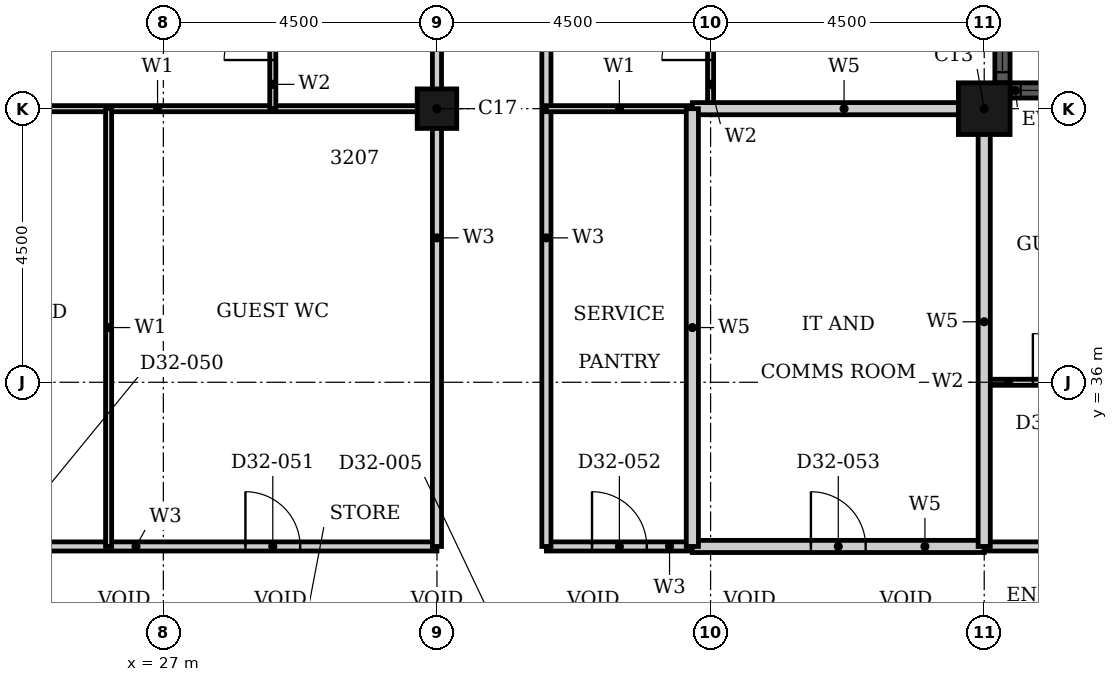
"""IFC4 building model, lengths in metres.
Left out: names, types, materials, properties, quantities, classifications, styles, units other than length and angle.
Written with IfcOpenShell. Run it as: python <this file> out.ifc"""

import sys

from ifc_helpers import new_model, si_unit, direction, frame, frame_2d, origin, origin_2d, place, context, subcontext, project, spatial, rectangle, hollow_rectangle, extrude, element, fill, save


model = new_model("IFC4")
c1 = context("Model", 3, precision=1e-05, world=origin(), true_north=direction((0.0, 1.0)))
c2 = subcontext(c1, "Body", "Model", "MODEL_VIEW")
j1 = project(units=[si_unit("LENGTHUNIT", "METRE"), si_unit("PLANEANGLEUNIT", "RADIAN")], contexts=[c1])
p1 = place(None, origin())
s1 = spatial("IfcSite", under=j1, at=p1, CompositionType="ELEMENT")
p2 = place(p1, origin())
s2 = spatial("IfcBuilding", under=s1, at=p2, CompositionType="ELEMENT")
p3 = place(p2, frame((0.0, 0.0, 129.6)))
s3 = spatial("IfcBuildingStorey", under=s2, at=p3, CompositionType="ELEMENT", Elevation=129.6)
p4 = place(p3, frame((40.5, 40.5, 0.0), z_axis=(0.0, 0.0, 1.0), x_axis=(1.0, 0.0, 0.0)))
e1 = element("IfcColumn", 1, at=p4, inside=s3, PredefinedType="COLUMN", context=c2, shape_type="SweptSolid", body=[
    extrude(hollow_rectangle(XDim=0.85, YDim=0.85, WallThickness=0.026, at=origin_2d()), origin(), (0.0, 0.0, 1.0), 3.6),
])
p5 = place(p3, frame((31.5, 40.5, 0.0), z_axis=(0.0, 0.0, 1.0), x_axis=(1.0, 0.0, 0.0)))
e2 = element("IfcColumn", 2, at=p5, inside=s3, PredefinedType="COLUMN", context=c2, shape_type="SweptSolid", body=[
    extrude(hollow_rectangle(XDim=0.65, YDim=0.65, WallThickness=0.021, at=origin_2d()), origin(), (0.0, 0.0, 1.0), 3.6),
])
p6 = place(p3, frame((44.575, 40.8, 0.0), z_axis=(0.0, 0.0, 1.0), x_axis=(-1.0, 0.0, 0.0)))
e3 = element("IfcWall", 3, at=p6, inside=s3, PredefinedType="SOLIDWALL", context=c2, shape_type="SweptSolid", body=[
    extrude(rectangle(XDim=3.65, YDim=0.25, at=frame_2d((1.825, 0.0))), origin(), (0.0, 0.0, 1.0), 3.6),
])
p7 = place(p6, frame((0.175, 0.0, 0.9)))
e4 = element("IfcOpeningElement", 4, at=p7, cuts=e3, PredefinedType="OPENING", context=c2, shape_type="SweptSolid", body=[
    extrude(rectangle(XDim=3.3, YDim=2.08, at=frame_2d((1.65, 1.04))), frame((0.0, 0.135, 0.0), z_axis=(0.0, -1.0, 0.0), x_axis=(1.0, 0.0, 0.0)), (0.0, 0.0, 1.0), 0.27),
])
p8 = place(p3, frame((40.8, 40.925, 0.0), z_axis=(0.0, 0.0, 1.0), x_axis=(0.0, 1.0, 0.0)))
e5 = element("IfcWall", 5, at=p8, inside=s3, PredefinedType="SOLIDWALL", context=c2, shape_type="SweptSolid", body=[
    extrude(rectangle(XDim=8.15, YDim=0.25, at=frame_2d((4.075, 0.0))), origin(), (0.0, 0.0, 1.0), 3.6),
])
p9 = place(p8, frame((0.175, 0.0, 0.9)))
e6 = element("IfcOpeningElement", 6, at=p9, cuts=e5, PredefinedType="OPENING", context=c2, shape_type="SweptSolid", body=[
    extrude(rectangle(XDim=3.3, YDim=2.08, at=frame_2d((1.65, 1.04))), frame((0.0, 0.135, 0.0), z_axis=(0.0, -1.0, 0.0), x_axis=(1.0, 0.0, 0.0)), (0.0, 0.0, 1.0), 0.27),
])
p10 = place(p8, frame((4.675, 0.0, 0.9)))
e7 = element("IfcOpeningElement", 7, at=p10, cuts=e5, PredefinedType="OPENING", context=c2, shape_type="SweptSolid", body=[
    extrude(rectangle(XDim=3.3, YDim=2.08, at=frame_2d((1.65, 1.04))), frame((0.0, 0.135, 0.0), z_axis=(0.0, -1.0, 0.0), x_axis=(1.0, 0.0, 0.0)), (0.0, 0.0, 1.0), 0.27),
])
p11 = place(p3, frame((18.0, 33.3, 0.0), z_axis=(0.0, 0.0, 1.0), x_axis=(1.0, 0.0, 0.0)))
e8 = element("IfcWall", 8, at=p11, inside=s3, PredefinedType="PARTITIONING", context=c2, shape_type="SweptSolid", body=[
    extrude(rectangle(XDim=13.5, YDim=0.15, at=frame_2d((6.75, 0.0))), origin(), (0.0, 0.0, 1.0), 3.3),
])
p12 = place(p11, frame((2.95, 0.0, 0.0)))
e9 = element("IfcOpeningElement", 9, at=p12, cuts=e8, PredefinedType="OPENING", context=c2, shape_type="SweptSolid", body=[
    extrude(rectangle(XDim=1.0, YDim=2.1, at=frame_2d((0.5, 1.05))), frame((0.0, 0.085, 0.0), z_axis=(0.0, -1.0, 0.0), x_axis=(1.0, 0.0, 0.0)), (0.0, 0.0, 1.0), 0.17),
])
p13 = place(p11, frame((5.85, 0.0, 0.0)))
e10 = element("IfcOpeningElement", 10, at=p13, cuts=e8, PredefinedType="OPENING", context=c2, shape_type="SweptSolid", body=[
    extrude(rectangle(XDim=0.9, YDim=2.1, at=frame_2d((0.45, 1.05))), frame((0.0, 0.085, 0.0), z_axis=(0.0, -1.0, 0.0), x_axis=(1.0, 0.0, 0.0)), (0.0, 0.0, 1.0), 0.17),
])
p14 = place(p11, frame((10.35, 0.0, 0.0)))
e11 = element("IfcOpeningElement", 11, at=p14, cuts=e8, PredefinedType="OPENING", context=c2, shape_type="SweptSolid", body=[
    extrude(rectangle(XDim=0.9, YDim=2.1, at=frame_2d((0.45, 1.05))), frame((0.0, 0.085, 0.0), z_axis=(0.0, -1.0, 0.0), x_axis=(1.0, 0.0, 0.0)), (0.0, 0.0, 1.0), 0.17),
])
p15 = place(p3, frame((40.5, 33.3, 0.0), z_axis=(0.0, 0.0, 1.0), x_axis=(1.0, 0.0, 0.0)))
e12 = element("IfcWall", 12, at=p15, inside=s3, PredefinedType="PARTITIONING", context=c2, shape_type="SweptSolid", body=[
    extrude(rectangle(XDim=6.3, YDim=0.15, at=frame_2d((3.15, 0.0))), origin(), (0.0, 0.0, 1.0), 3.3),
])
p16 = place(p15, frame((2.95, 0.0, 0.0)))
e13 = element("IfcOpeningElement", 13, at=p16, cuts=e12, PredefinedType="OPENING", context=c2, shape_type="SweptSolid", body=[
    extrude(rectangle(XDim=1.0, YDim=2.1, at=frame_2d((0.5, 1.05))), frame((0.0, 0.085, 0.0), z_axis=(0.0, -1.0, 0.0), x_axis=(1.0, 0.0, 0.0)), (0.0, 0.0, 1.0), 0.17),
])
p17 = place(p15, frame((4.95, 0.0, 0.0)))
e14 = element("IfcOpeningElement", 14, at=p17, cuts=e12, PredefinedType="OPENING", context=c2, shape_type="SweptSolid", body=[
    extrude(rectangle(XDim=0.9, YDim=2.1, at=frame_2d((0.45, 1.05))), frame((0.0, 0.085, 0.0), z_axis=(0.0, -1.0, 0.0), x_axis=(1.0, 0.0, 0.0)), (0.0, 0.0, 1.0), 0.17),
])
p18 = place(p3, frame((33.3, 33.3, 0.0), z_axis=(0.0, 0.0, 1.0), x_axis=(1.0, 0.0, 0.0)))
e15 = element("IfcWall", 15, at=p18, inside=s3, PredefinedType="PARTITIONING", context=c2, shape_type="SweptSolid", body=[
    extrude(rectangle(XDim=2.4, YDim=0.15, at=frame_2d((1.2, 0.0))), origin(), (0.0, 0.0, 1.0), 3.3),
])
p19 = place(p18, frame((0.75, 0.0, 0.0)))
e16 = element("IfcOpeningElement", 16, at=p19, cuts=e15, PredefinedType="OPENING", context=c2, shape_type="SweptSolid", body=[
    extrude(rectangle(XDim=0.9, YDim=2.1, at=frame_2d((0.45, 1.05))), frame((0.0, 0.085, 0.0), z_axis=(0.0, -1.0, 0.0), x_axis=(1.0, 0.0, 0.0)), (0.0, 0.0, 1.0), 0.17),
])
p20 = place(p3, frame((31.5, 33.3, 0.0), z_axis=(0.0, 0.0, 1.0), x_axis=(0.0, 1.0, 0.0)))
e17 = element("IfcWall", 17, at=p20, inside=s3, PredefinedType="PARTITIONING", context=c2, shape_type="SweptSolid", body=[
    extrude(rectangle(XDim=11.7, YDim=0.15, at=frame_2d((5.85, 0.0))), origin(), (0.0, 0.0, 1.0), 2.58),
])
p21 = place(p20, frame((10.15, 0.0, 0.0)))
e18 = element("IfcOpeningElement", 18, at=p21, cuts=e17, PredefinedType="OPENING", context=c2, shape_type="SweptSolid", body=[
    extrude(rectangle(XDim=1.0, YDim=2.1, at=frame_2d((0.5, 1.05))), frame((0.0, 0.085, 0.0), z_axis=(0.0, -1.0, 0.0), x_axis=(1.0, 0.0, 0.0)), (0.0, 0.0, 1.0), 0.17),
])
p22 = place(p3, frame((33.3, 33.3, 0.0), z_axis=(0.0, 0.0, 1.0), x_axis=(0.0, 1.0, 0.0)))
e19 = element("IfcWall", 19, at=p22, inside=s3, PredefinedType="PARTITIONING", context=c2, shape_type="SweptSolid", body=[
    extrude(rectangle(XDim=11.7, YDim=0.15, at=frame_2d((5.85, 0.0))), origin(), (0.0, 0.0, 1.0), 3.3),
])
p23 = place(p22, frame((10.15, 0.0, 0.0)))
e20 = element("IfcOpeningElement", 20, at=p23, cuts=e19, PredefinedType="OPENING", context=c2, shape_type="SweptSolid", body=[
    extrude(rectangle(XDim=1.0, YDim=2.1, at=frame_2d((0.5, 1.05))), frame((0.0, 0.085, 0.0), z_axis=(0.0, -1.0, 0.0), x_axis=(1.0, 0.0, 0.0)), (0.0, 0.0, 1.0), 0.17),
])
p24 = place(p3, frame((33.3, 40.5, 0.0), z_axis=(0.0, 0.0, 1.0), x_axis=(1.0, 0.0, 0.0)))
e21 = element("IfcWall", 21, at=p24, inside=s3, PredefinedType="PARTITIONING", context=c2, shape_type="SweptSolid", body=[
    extrude(rectangle(XDim=2.4, YDim=0.1, at=frame_2d((1.2, 0.0))), origin(), (0.0, 0.0, 1.0), 2.38),
])
p25 = place(p3, frame((22.31, 40.5, 0.0), z_axis=(0.0, 0.0, 1.0), x_axis=(1.0, 0.0, 0.0)))
e22 = element("IfcWall", 22, at=p25, inside=s3, PredefinedType="PARTITIONING", context=c2, shape_type="SweptSolid", body=[
    extrude(rectangle(XDim=9.19, YDim=0.1, at=frame_2d((4.595, 0.0))), origin(), (0.0, 0.0, 1.0), 2.38),
])
p26 = place(p3, frame((26.1, 33.3, 0.0), z_axis=(0.0, 0.0, 1.0), x_axis=(0.0, 1.0, 0.0)))
e23 = element("IfcWall", 23, at=p26, inside=s3, PredefinedType="PARTITIONING", context=c2, shape_type="SweptSolid", body=[
    extrude(rectangle(XDim=7.2, YDim=0.1, at=frame_2d((3.6, 0.0))), origin(), (0.0, 0.0, 1.0), 3.3),
])
p27 = place(p3, frame((40.5, 36.0, 0.0), z_axis=(0.0, 0.0, 1.0), x_axis=(1.0, 0.0, 0.0)))
e24 = element("IfcWall", 24, at=p27, inside=s3, PredefinedType="PARTITIONING", context=c2, shape_type="SweptSolid", body=[
    extrude(rectangle(XDim=2.4, YDim=0.1, at=frame_2d((1.2, 0.0))), origin(), (0.0, 0.0, 1.0), 3.3),
])
p28 = place(p27, frame((0.8, 0.0, 0.0)))
e25 = element("IfcOpeningElement", 25, at=p28, cuts=e24, PredefinedType="OPENING", context=c2, shape_type="SweptSolid", body=[
    extrude(rectangle(XDim=0.8, YDim=2.1, at=frame_2d((0.4, 1.05))), frame((0.0, 0.06, 0.0), z_axis=(0.0, -1.0, 0.0), x_axis=(1.0, 0.0, 0.0)), (0.0, 0.0, 1.0), 0.12),
])
p29 = place(p3, frame((28.8, 40.5, 0.0), z_axis=(0.0, 0.0, 1.0), x_axis=(0.0, 1.0, 0.0)))
e26 = element("IfcWall", 26, at=p29, inside=s3, PredefinedType="PARTITIONING", context=c2, shape_type="SweptSolid", body=[
    extrude(rectangle(XDim=2.4, YDim=0.1, at=frame_2d((1.2, 0.0))), origin(), (0.0, 0.0, 1.0), 3.3),
])
p30 = place(p29, frame((0.8, 0.0, 0.0)))
e27 = element("IfcOpeningElement", 27, at=p30, cuts=e26, PredefinedType="OPENING", context=c2, shape_type="SweptSolid", body=[
    extrude(rectangle(XDim=0.8, YDim=2.1, at=frame_2d((0.4, 1.05))), frame((0.0, 0.06, 0.0), z_axis=(0.0, -1.0, 0.0), x_axis=(1.0, 0.0, 0.0)), (0.0, 0.0, 1.0), 0.12),
])
p31 = place(p3, frame((36.0, 40.5, 0.0), z_axis=(0.0, 0.0, 1.0), x_axis=(0.0, 1.0, 0.0)))
e28 = element("IfcWall", 28, at=p31, inside=s3, PredefinedType="PARTITIONING", context=c2, shape_type="SweptSolid", body=[
    extrude(rectangle(XDim=2.4, YDim=0.1, at=frame_2d((1.2, 0.0))), origin(), (0.0, 0.0, 1.0), 2.58),
])
p32 = place(p31, frame((0.8, 0.0, 0.0)))
e29 = element("IfcOpeningElement", 29, at=p32, cuts=e28, PredefinedType="OPENING", context=c2, shape_type="SweptSolid", body=[
    extrude(rectangle(XDim=0.8, YDim=2.1, at=frame_2d((0.4, 1.05))), frame((0.0, 0.06, 0.0), z_axis=(0.0, -1.0, 0.0), x_axis=(1.0, 0.0, 0.0)), (0.0, 0.0, 1.0), 0.12),
])
p33 = place(p3, frame((35.7, 33.3, 0.0), z_axis=(0.0, 0.0, 1.0), x_axis=(1.0, 0.0, 0.0)))
e30 = element("IfcWall", 30, at=p33, inside=s3, PredefinedType="PARTITIONING", context=c2, shape_type="SweptSolid", body=[
    extrude(rectangle(XDim=4.8, YDim=0.2, at=frame_2d((2.4, 0.0))), origin(), (0.0, 0.0, 1.0), 3.3),
])
p34 = place(p33, frame((1.95, 0.0, 0.0)))
e31 = element("IfcOpeningElement", 31, at=p34, cuts=e30, PredefinedType="OPENING", context=c2, shape_type="SweptSolid", body=[
    extrude(rectangle(XDim=0.9, YDim=2.1, at=frame_2d((0.45, 1.05))), frame((0.0, 0.11, 0.0), z_axis=(0.0, -1.0, 0.0), x_axis=(1.0, 0.0, 0.0)), (0.0, 0.0, 1.0), 0.22),
])
p35 = place(p3, frame((35.7, 40.5, 0.0), z_axis=(0.0, 0.0, 1.0), x_axis=(1.0, 0.0, 0.0)))
e32 = element("IfcWall", 32, at=p35, inside=s3, PredefinedType="PARTITIONING", context=c2, shape_type="SweptSolid", body=[
    extrude(rectangle(XDim=4.99, YDim=0.2, at=frame_2d((2.495, 0.0))), origin(), (0.0, 0.0, 1.0), 2.38),
])
p36 = place(p3, frame((35.7, 33.3, 0.0), z_axis=(0.0, 0.0, 1.0), x_axis=(0.0, 1.0, 0.0)))
e33 = element("IfcWall", 33, at=p36, inside=s3, PredefinedType="PARTITIONING", context=c2, shape_type="SweptSolid", body=[
    extrude(rectangle(XDim=7.2, YDim=0.2, at=frame_2d((3.6, 0.0))), origin(), (0.0, 0.0, 1.0), 3.3),
])
p37 = place(p3, frame((40.5, 33.3, 0.0), z_axis=(0.0, 0.0, 1.0), x_axis=(0.0, 1.0, 0.0)))
e34 = element("IfcWall", 34, at=p37, inside=s3, PredefinedType="PARTITIONING", context=c2, shape_type="SweptSolid", body=[
    extrude(rectangle(XDim=7.39, YDim=0.2, at=frame_2d((3.695, 0.0))), origin(), (0.0, 0.0, 1.0), 3.3),
])
p38 = place(p7, origin())
e35 = element("IfcWindow", 35, at=p38, inside=s3, PartitioningType="SINGLE_PANEL", PredefinedType="WINDOW", context=c2, shape_type="SweptSolid", body=[
    extrude(rectangle(XDim=3.3, YDim=2.08, at=frame_2d((1.65, 1.04))), frame((0.0, 0.03, 0.0), z_axis=(0.0, -1.0, 0.0), x_axis=(1.0, 0.0, 0.0)), (0.0, 0.0, 1.0), 0.06),
])
fill(e4, e35)
p39 = place(p9, origin())
e36 = element("IfcWindow", 36, at=p39, inside=s3, PartitioningType="SINGLE_PANEL", PredefinedType="WINDOW", context=c2, shape_type="SweptSolid", body=[
    extrude(rectangle(XDim=3.3, YDim=2.08, at=frame_2d((1.65, 1.04))), frame((0.0, 0.03, 0.0), z_axis=(0.0, -1.0, 0.0), x_axis=(1.0, 0.0, 0.0)), (0.0, 0.0, 1.0), 0.06),
])
fill(e6, e36)
p40 = place(p30, origin())
e37 = element("IfcDoor", 37, at=p40, inside=s3, OperationType="SINGLE_SWING_RIGHT", PredefinedType="DOOR", context=c2, shape_type="SweptSolid", body=[
    extrude(rectangle(XDim=0.8, YDim=2.1, at=frame_2d((0.4, 1.05))), frame((0.0, 0.025, 0.0), z_axis=(0.0, -1.0, 0.0), x_axis=(1.0, 0.0, 0.0)), (0.0, 0.0, 1.0), 0.05),
])
fill(e27, e37)
p41 = place(p32, origin())
e38 = element("IfcDoor", 38, at=p41, inside=s3, OperationType="SINGLE_SWING_RIGHT", PredefinedType="DOOR", context=c2, shape_type="SweptSolid", body=[
    extrude(rectangle(XDim=0.8, YDim=2.1, at=frame_2d((0.4, 1.05))), frame((0.0, 0.025, 0.0), z_axis=(0.0, -1.0, 0.0), x_axis=(1.0, 0.0, 0.0)), (0.0, 0.0, 1.0), 0.05),
])
fill(e29, e38)
p42 = place(p28, origin())
e39 = element("IfcDoor", 39, at=p42, inside=s3, OperationType="SINGLE_SWING_RIGHT", PredefinedType="DOOR", context=c2, shape_type="SweptSolid", body=[
    extrude(rectangle(XDim=0.8, YDim=2.1, at=frame_2d((0.4, 1.05))), frame((0.0, 0.025, 0.0), z_axis=(0.0, -1.0, 0.0), x_axis=(1.0, 0.0, 0.0)), (0.0, 0.0, 1.0), 0.05),
])
fill(e25, e39)
p43 = place(p14, origin())
e40 = element("IfcDoor", 40, at=p43, inside=s3, OperationType="SINGLE_SWING_RIGHT", PredefinedType="DOOR", context=c2, shape_type="SweptSolid", body=[
    extrude(rectangle(XDim=0.9, YDim=2.1, at=frame_2d((0.45, 1.05))), frame((0.0, 0.025, 0.0), z_axis=(0.0, -1.0, 0.0), x_axis=(1.0, 0.0, 0.0)), (0.0, 0.0, 1.0), 0.05),
])
fill(e11, e40)
p44 = place(p19, origin())
e41 = element("IfcDoor", 41, at=p44, inside=s3, OperationType="SINGLE_SWING_RIGHT", PredefinedType="DOOR", context=c2, shape_type="SweptSolid", body=[
    extrude(rectangle(XDim=0.9, YDim=2.1, at=frame_2d((0.45, 1.05))), frame((0.0, 0.025, 0.0), z_axis=(0.0, -1.0, 0.0), x_axis=(1.0, 0.0, 0.0)), (0.0, 0.0, 1.0), 0.05),
])
fill(e16, e41)
p45 = place(p34, origin())
e42 = element("IfcDoor", 42, at=p45, inside=s3, OperationType="SINGLE_SWING_RIGHT", PredefinedType="DOOR", context=c2, shape_type="SweptSolid", body=[
    extrude(rectangle(XDim=0.9, YDim=2.1, at=frame_2d((0.45, 1.05))), frame((0.0, 0.025, 0.0), z_axis=(0.0, -1.0, 0.0), x_axis=(1.0, 0.0, 0.0)), (0.0, 0.0, 1.0), 0.05),
])
fill(e31, e42)
save(model, sys.argv[1])
